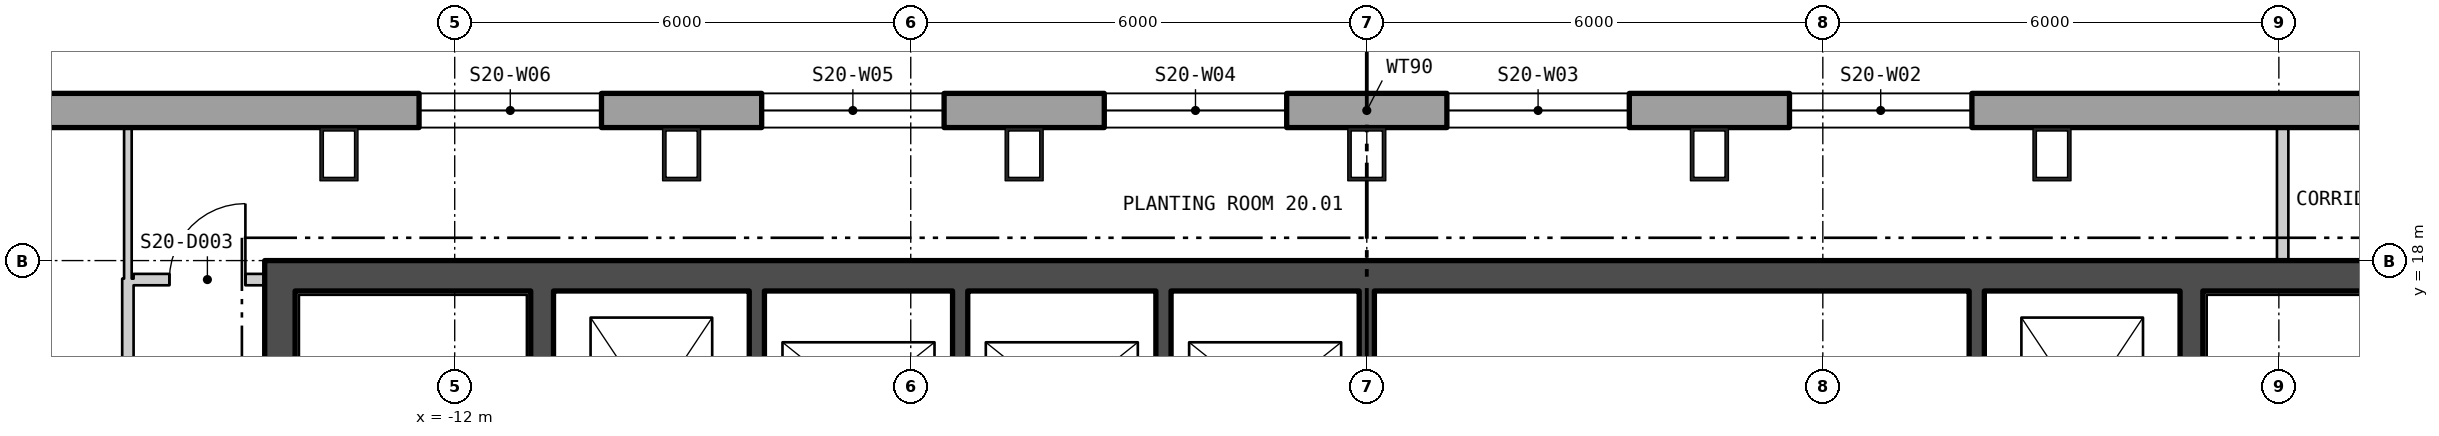
"""IFC4 building model, lengths in metres.
Left out: names, types, materials, properties, quantities, classifications, styles, units other than length and angle.
Written with IfcOpenShell. Run it as: python <this file> out.ifc"""

import sys

from ifc_helpers import new_model, si_unit, direction, frame, frame_2d, origin, origin_2d, place, context, subcontext, project, spatial, polyline, rectangle, hollow_rectangle, outline, extrude, element, fill, save


model = new_model("IFC4")
c1 = context("Model", 3, precision=1e-05, world=origin(), true_north=direction((0.0, 1.0)))
c2 = subcontext(c1, "Body", "Model", "MODEL_VIEW")
j1 = project(units=[si_unit("LENGTHUNIT", "METRE"), si_unit("PLANEANGLEUNIT", "RADIAN")], contexts=[c1])
p1 = place(None, origin())
s1 = spatial("IfcSite", under=j1, at=p1, CompositionType="ELEMENT")
p2 = place(p1, origin())
s2 = spatial("IfcBuilding", under=s1, at=p2, CompositionType="ELEMENT")
p3 = place(p2, frame((0.0, 0.0, 268.8)))
s3 = spatial("IfcBuildingStorey", under=s2, at=p3, CompositionType="ELEMENT", Elevation=268.8)
for number, where, z_axis, x_axis in (
    (1, (9.015, 19.4, 0.0), (0.0, 0.0, 1.0), (-1.0, 0.0, 0.0)),
    (2, (4.508, 19.4, 0.0), (0.0, 0.0, 1.0), (-1.0, 0.0, 0.0)),
    (3, (0.0, 19.4, 0.0), (0.0, 0.0, 1.0), (-1.0, 0.0, 0.0)),
    (4, (-4.508, 19.4, 0.0), (0.0, 0.0, 1.0), (-1.0, 0.0, 0.0)),
    (5, (-9.015, 19.4, 0.0), (0.0, 0.0, 1.0), (-1.0, 0.0, 0.0)),
    (6, (-13.523, 19.4, 0.0), (0.0, 0.0, 1.0), (-1.0, 0.0, 0.0)),
):
    element("IfcColumn", number, at=place(p3, frame(where, z_axis=z_axis, x_axis=x_axis)), inside=s3, PredefinedType="COLUMN", context=c2, shape_type="SweptSolid", body=[
        extrude(hollow_rectangle(XDim=0.5, YDim=0.7, WallThickness=0.045, at=origin_2d()), origin(), (0.0, 0.0, 1.0), 3.9),
    ])
p4 = place(p3, frame((22.87, 19.975, -0.4), z_axis=(0.0, 0.0, 1.0), x_axis=(-1.0, 0.0, 0.0)))
e7 = element("IfcWall", 7, at=p4, inside=s3, PredefinedType="SOLIDWALL", context=c2, shape_type="SweptSolid", body=[
    extrude(outline(polyline([(-0.13, -0.225), (45.87, -0.225), (45.61, 0.225), (0.13, 0.225), (-0.13, -0.225)])), origin(), (0.0, 0.0, 1.0), 3.9),
])
p5 = place(p4, frame((1.424, 0.0, 1.3)))
e8 = element("IfcOpeningElement", 8, at=p5, cuts=e7, PredefinedType="OPENING", context=c2, shape_type="SweptSolid", body=[
    extrude(rectangle(XDim=2.4, YDim=2.0, at=frame_2d((1.2, 1.0))), frame((0.0, 0.235, 0.0), z_axis=(0.0, -1.0, 0.0), x_axis=(1.0, 0.0, 0.0)), (0.0, 0.0, 1.0), 0.47),
])
p6 = place(p4, frame((14.909, 0.0, 1.3)))
e9 = element("IfcOpeningElement", 9, at=p6, cuts=e7, PredefinedType="OPENING", context=c2, shape_type="SweptSolid", body=[
    extrude(rectangle(XDim=2.4, YDim=2.0, at=frame_2d((1.2, 1.0))), frame((0.0, 0.235, 0.0), z_axis=(0.0, -1.0, 0.0), x_axis=(1.0, 0.0, 0.0)), (0.0, 0.0, 1.0), 0.47),
])
p7 = place(p4, frame((19.416, 0.0, 1.3)))
e10 = element("IfcOpeningElement", 10, at=p7, cuts=e7, PredefinedType="OPENING", context=c2, shape_type="SweptSolid", body=[
    extrude(rectangle(XDim=2.4, YDim=2.0, at=frame_2d((1.2, 1.0))), frame((0.0, 0.235, 0.0), z_axis=(0.0, -1.0, 0.0), x_axis=(1.0, 0.0, 0.0)), (0.0, 0.0, 1.0), 0.47),
])
p8 = place(p4, frame((23.924, 0.0, 1.3)))
e11 = element("IfcOpeningElement", 11, at=p8, cuts=e7, PredefinedType="OPENING", context=c2, shape_type="SweptSolid", body=[
    extrude(rectangle(XDim=2.4, YDim=2.0, at=frame_2d((1.2, 1.0))), frame((0.0, 0.235, 0.0), z_axis=(0.0, -1.0, 0.0), x_axis=(1.0, 0.0, 0.0)), (0.0, 0.0, 1.0), 0.47),
])
p9 = place(p4, frame((28.431, 0.0, 1.3)))
e12 = element("IfcOpeningElement", 12, at=p9, cuts=e7, PredefinedType="OPENING", context=c2, shape_type="SweptSolid", body=[
    extrude(rectangle(XDim=2.4, YDim=2.0, at=frame_2d((1.2, 1.0))), frame((0.0, 0.235, 0.0), z_axis=(0.0, -1.0, 0.0), x_axis=(1.0, 0.0, 0.0)), (0.0, 0.0, 1.0), 0.47),
])
p10 = place(p4, frame((32.939, 0.0, 1.3)))
e13 = element("IfcOpeningElement", 13, at=p10, cuts=e7, PredefinedType="OPENING", context=c2, shape_type="SweptSolid", body=[
    extrude(rectangle(XDim=2.4, YDim=2.0, at=frame_2d((1.2, 1.0))), frame((0.0, 0.235, 0.0), z_axis=(0.0, -1.0, 0.0), x_axis=(1.0, 0.0, 0.0)), (0.0, 0.0, 1.0), 0.47),
])
p11 = place(p4, frame((41.916, 0.0, 1.3)))
e14 = element("IfcOpeningElement", 14, at=p11, cuts=e7, PredefinedType="OPENING", context=c2, shape_type="SweptSolid", body=[
    extrude(rectangle(XDim=2.4, YDim=2.0, at=frame_2d((1.2, 1.0))), frame((0.0, 0.235, 0.0), z_axis=(0.0, -1.0, 0.0), x_axis=(1.0, 0.0, 0.0)), (0.0, 0.0, 1.0), 0.47),
])
p12 = place(p3, frame((-14.5, 17.8, 0.0), z_axis=(0.0, 0.0, 1.0), x_axis=(1.0, 0.0, 0.0)))
e15 = element("IfcWall", 15, at=p12, inside=s3, PredefinedType="SHEAR", context=c2, shape_type="SweptSolid", body=[
    extrude(rectangle(XDim=29.0, YDim=0.4, at=frame_2d((14.5, 0.0))), origin(), (0.0, 0.0, 1.0), 3.7),
])
p13 = place(p3, frame((-14.3, 4.4, 0.0), z_axis=(0.0, 0.0, 1.0), x_axis=(0.0, 1.0, 0.0)))
e16 = element("IfcWall", 16, at=p13, inside=s3, PredefinedType="SHEAR", context=c2, shape_type="SweptSolid", body=[
    extrude(rectangle(XDim=13.2, YDim=0.4, at=frame_2d((6.6, 0.0))), origin(), (0.0, 0.0, 1.0), 3.7),
])
p14 = place(p13, frame((3.05, 0.0, 0.0)))
e17 = element("IfcOpeningElement", 17, at=p14, cuts=e16, PredefinedType="OPENING", context=c2, shape_type="SweptSolid", body=[
    extrude(rectangle(XDim=1.5, YDim=2.1, at=frame_2d((0.75, 1.05))), frame((0.0, 0.21, 0.0), z_axis=(0.0, -1.0, 0.0), x_axis=(1.0, 0.0, 0.0)), (0.0, 0.0, 1.0), 0.42),
])
p15 = place(p3, frame((-10.85, 4.4, 0.0), z_axis=(0.0, 0.0, 1.0), x_axis=(0.0, 1.0, 0.0)))
e18 = element("IfcWall", 18, at=p15, inside=s3, PredefinedType="SHEAR", context=c2, shape_type="SweptSolid", body=[
    extrude(rectangle(XDim=13.2, YDim=0.3, at=frame_2d((6.6, 0.0))), origin(), (0.0, 0.0, 1.0), 3.7),
])
p16 = place(p15, frame((1.575, 0.0, 0.0)))
e19 = element("IfcOpeningElement", 19, at=p16, cuts=e18, PredefinedType="OPENING", context=c2, shape_type="SweptSolid", body=[
    extrude(rectangle(XDim=1.25, YDim=2.1, at=frame_2d((0.625, 1.05))), frame((0.0, 0.16, 0.0), z_axis=(0.0, -1.0, 0.0), x_axis=(1.0, 0.0, 0.0)), (0.0, 0.0, 1.0), 0.32),
])
p17 = place(p15, frame((0.4, 0.0, 0.0)))
e20 = element("IfcOpeningElement", 20, at=p17, cuts=e18, PredefinedType="OPENING", context=c2, shape_type="SweptSolid", body=[
    extrude(rectangle(XDim=0.9, YDim=2.1, at=frame_2d((0.45, 1.05))), frame((0.0, 0.16, 0.0), z_axis=(0.0, -1.0, 0.0), x_axis=(1.0, 0.0, 0.0)), (0.0, 0.0, 1.0), 0.32),
])
p18 = place(p3, frame((10.85, 4.4, 0.0), z_axis=(0.0, 0.0, 1.0), x_axis=(0.0, 1.0, 0.0)))
e21 = element("IfcWall", 21, at=p18, inside=s3, PredefinedType="SHEAR", context=c2, shape_type="SweptSolid", body=[
    extrude(rectangle(XDim=13.2, YDim=0.3, at=frame_2d((6.6, 0.0))), origin(), (0.0, 0.0, 1.0), 3.7),
])
p19 = place(p18, frame((1.575, 0.0, 0.0)))
e22 = element("IfcOpeningElement", 22, at=p19, cuts=e21, PredefinedType="OPENING", context=c2, shape_type="SweptSolid", body=[
    extrude(rectangle(XDim=1.25, YDim=2.1, at=frame_2d((0.625, 1.05))), frame((0.0, 0.16, 0.0), z_axis=(0.0, -1.0, 0.0), x_axis=(1.0, 0.0, 0.0)), (0.0, 0.0, 1.0), 0.32),
])
p20 = place(p18, frame((0.4, 0.0, 0.0)))
e23 = element("IfcOpeningElement", 23, at=p20, cuts=e21, PredefinedType="OPENING", context=c2, shape_type="SweptSolid", body=[
    extrude(rectangle(XDim=0.9, YDim=2.1, at=frame_2d((0.45, 1.05))), frame((0.0, 0.16, 0.0), z_axis=(0.0, -1.0, 0.0), x_axis=(1.0, 0.0, 0.0)), (0.0, 0.0, 1.0), 0.32),
])
for number, where, z_axis, x_axis in (
    (24, (-8.025, 14.7, 0.0), (0.0, 0.0, 1.0), (0.0, 1.0, 0.0)),
    (25, (-5.35, 14.7, 0.0), (0.0, 0.0, 1.0), (0.0, 1.0, 0.0)),
    (26, (-2.675, 14.7, 0.0), (0.0, 0.0, 1.0), (0.0, 1.0, 0.0)),
    (27, (0.0, 14.7, 0.0), (0.0, 0.0, 1.0), (0.0, 1.0, 0.0)),
    (28, (8.025, 14.7, 0.0), (0.0, 0.0, 1.0), (0.0, 1.0, 0.0)),
):
    element("IfcWall", number, at=place(p3, frame(where, z_axis=z_axis, x_axis=x_axis)), inside=s3, PredefinedType="SHEAR", context=c2, shape_type="SweptSolid", body=[
        extrude(rectangle(XDim=2.9, YDim=0.2, at=frame_2d((1.45, 0.0))), origin(), (0.0, 0.0, 1.0), 3.7),
    ])
p21 = place(p3, frame((-16.3, 2.125, 0.0), z_axis=(0.0, 0.0, 1.0), x_axis=(0.0, 1.0, 0.0)))
e29 = element("IfcWall", 29, at=p21, inside=s3, PredefinedType="PARTITIONING", context=c2, shape_type="SweptSolid", body=[
    extrude(rectangle(XDim=15.637, YDim=0.15, at=frame_2d((7.819, 0.0))), origin(), (0.0, 0.0, 1.0), 3.7),
])
p22 = place(p21, frame((12.705, 0.0, 0.0)))
e30 = element("IfcOpeningElement", 30, at=p22, cuts=e29, PredefinedType="OPENING", context=c2, shape_type="SweptSolid", body=[
    extrude(rectangle(XDim=1.0, YDim=2.1, at=frame_2d((0.5, 1.05))), frame((0.0, 0.085, 0.0), z_axis=(0.0, -1.0, 0.0), x_axis=(1.0, 0.0, 0.0)), (0.0, 0.0, 1.0), 0.17),
])
p23 = place(p3, frame((-16.3, 17.762, 0.0), z_axis=(0.0, 0.0, 1.0), x_axis=(0.0, 1.0, 0.0)))
e31 = element("IfcWall", 31, at=p23, inside=s3, PredefinedType="PARTITIONING", context=c2, shape_type="SweptSolid", body=[
    extrude(rectangle(XDim=1.988, YDim=0.1, at=frame_2d((0.994, 0.0))), origin(), (0.0, 0.0, 1.0), 3.7),
])
p24 = place(p3, frame((-16.225, 17.75, 0.0), z_axis=(0.0, 0.0, 1.0), x_axis=(1.0, 0.0, 0.0)))
e32 = element("IfcWall", 32, at=p24, inside=s3, PredefinedType="PARTITIONING", context=c2, shape_type="SweptSolid", body=[
    extrude(rectangle(XDim=1.725, YDim=0.15, at=frame_2d((0.863, 0.0))), origin(), (0.0, 0.0, 1.0), 3.7),
])
p25 = place(p24, frame((0.471, 0.0, 0.0)))
e33 = element("IfcOpeningElement", 33, at=p25, cuts=e32, PredefinedType="OPENING", context=c2, shape_type="SweptSolid", body=[
    extrude(rectangle(XDim=1.0, YDim=2.1, at=frame_2d((0.5, 1.05))), frame((0.0, 0.085, 0.0), z_axis=(0.0, -1.0, 0.0), x_axis=(1.0, 0.0, 0.0)), (0.0, 0.0, 1.0), 0.17),
])
p26 = place(p3, frame((12.05, 18.0, 0.0), z_axis=(0.0, 0.0, 1.0), x_axis=(0.0, 1.0, 0.0)))
e34 = element("IfcWall", 34, at=p26, inside=s3, PredefinedType="PARTITIONING", context=c2, shape_type="SweptSolid", body=[
    extrude(rectangle(XDim=1.75, YDim=0.15, at=frame_2d((0.875, 0.0))), origin(), (0.0, 0.0, 1.0), 3.7),
])
p27 = place(p6, origin())
e35 = element("IfcWindow", 35, at=p27, inside=s3, PartitioningType="SINGLE_PANEL", PredefinedType="WINDOW", context=c2, shape_type="SweptSolid", body=[
    extrude(rectangle(XDim=2.4, YDim=2.0, at=frame_2d((1.2, 1.0))), frame((0.0, 0.105, 0.0), z_axis=(0.0, -1.0, 0.0), x_axis=(1.0, 0.0, 0.0)), (0.0, 0.0, 1.0), 0.06),
])
fill(e9, e35)
p28 = place(p7, origin())
e36 = element("IfcWindow", 36, at=p28, inside=s3, PartitioningType="SINGLE_PANEL", PredefinedType="WINDOW", context=c2, shape_type="SweptSolid", body=[
    extrude(rectangle(XDim=2.4, YDim=2.0, at=frame_2d((1.2, 1.0))), frame((0.0, 0.105, 0.0), z_axis=(0.0, -1.0, 0.0), x_axis=(1.0, 0.0, 0.0)), (0.0, 0.0, 1.0), 0.06),
])
fill(e10, e36)
p29 = place(p8, origin())
e37 = element("IfcWindow", 37, at=p29, inside=s3, PartitioningType="SINGLE_PANEL", PredefinedType="WINDOW", context=c2, shape_type="SweptSolid", body=[
    extrude(rectangle(XDim=2.4, YDim=2.0, at=frame_2d((1.2, 1.0))), frame((0.0, 0.105, 0.0), z_axis=(0.0, -1.0, 0.0), x_axis=(1.0, 0.0, 0.0)), (0.0, 0.0, 1.0), 0.06),
])
fill(e11, e37)
p30 = place(p9, origin())
e38 = element("IfcWindow", 38, at=p30, inside=s3, PartitioningType="SINGLE_PANEL", PredefinedType="WINDOW", context=c2, shape_type="SweptSolid", body=[
    extrude(rectangle(XDim=2.4, YDim=2.0, at=frame_2d((1.2, 1.0))), frame((0.0, 0.105, 0.0), z_axis=(0.0, -1.0, 0.0), x_axis=(1.0, 0.0, 0.0)), (0.0, 0.0, 1.0), 0.06),
])
fill(e12, e38)
p31 = place(p10, origin())
e39 = element("IfcWindow", 39, at=p31, inside=s3, PartitioningType="SINGLE_PANEL", PredefinedType="WINDOW", context=c2, shape_type="SweptSolid", body=[
    extrude(rectangle(XDim=2.4, YDim=2.0, at=frame_2d((1.2, 1.0))), frame((0.0, 0.105, 0.0), z_axis=(0.0, -1.0, 0.0), x_axis=(1.0, 0.0, 0.0)), (0.0, 0.0, 1.0), 0.06),
])
fill(e13, e39)
p32 = place(p25, origin())
e40 = element("IfcDoor", 40, at=p32, inside=s3, OperationType="SINGLE_SWING_LEFT", PredefinedType="DOOR", context=c2, shape_type="SweptSolid", body=[
    extrude(rectangle(XDim=1.0, YDim=2.1, at=frame_2d((0.5, 1.05))), frame((0.0, 0.025, 0.0), z_axis=(0.0, -1.0, 0.0), x_axis=(1.0, 0.0, 0.0)), (0.0, 0.0, 1.0), 0.05),
])
fill(e33, e40)
save(model, sys.argv[1])
